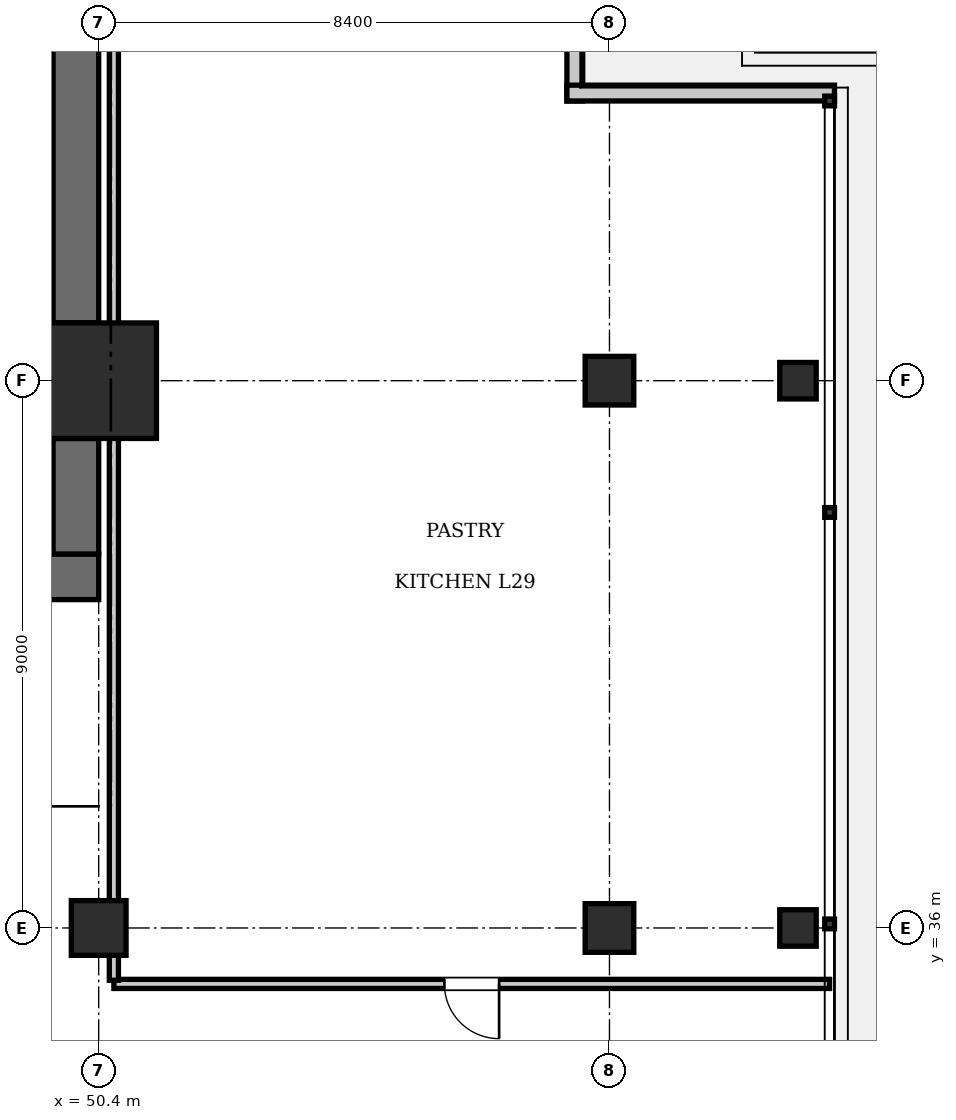
"""IFC4 building model, lengths in metres.
Left out: names, types, materials, properties, quantities, classifications, styles, units other than length and angle.
Written with IfcOpenShell. Run it as: python <this file> out.ifc"""

import sys

from ifc_helpers import new_model, si_unit, direction, frame, frame_2d, origin, origin_2d, place, context, subcontext, project, spatial, rectangle, i_section, extrude, element, fill, save


model = new_model("IFC4")
c1 = context("Model", 3, precision=1e-05, world=origin(), true_north=direction((0.0, 1.0)))
c2 = subcontext(c1, "Body", "Model", "MODEL_VIEW")
j1 = project(units=[si_unit("LENGTHUNIT", "METRE"), si_unit("PLANEANGLEUNIT", "RADIAN")], contexts=[c1])
p1 = place(None, origin())
s1 = spatial("IfcSite", under=j1, at=p1, CompositionType="ELEMENT")
p2 = place(p1, origin())
s2 = spatial("IfcBuilding", under=s1, at=p2, CompositionType="ELEMENT")
p3 = place(p2, frame((0.0, 0.0, 122.5)))
s3 = spatial("IfcBuildingStorey", under=s2, at=p3, CompositionType="ELEMENT", Elevation=122.5)
p4 = place(p3, frame((50.4, 45.0, 0.0), z_axis=(0.0, 0.0, 1.0), x_axis=(1.0, 0.0, 0.0)))
e1 = element("IfcColumn", 1, at=p4, inside=s3, PredefinedType="COLUMN", context=c2, shape_type="SweptSolid", body=[
    extrude(rectangle(XDim=1.9, YDim=1.9, at=origin_2d()), origin(), (0.0, 0.0, 1.0), 4.9),
])
p5 = place(p3, frame((43.6, 41.775, 0.0), z_axis=(0.0, 0.0, 1.0), x_axis=(1.0, 0.0, 0.0)))
e2 = element("IfcWall", 2, at=p5, inside=s3, PredefinedType="SHEAR", context=c2, shape_type="SweptSolid", body=[
    extrude(rectangle(XDim=6.8, YDim=0.75, at=frame_2d((3.4, 0.0))), origin(), (0.0, 0.0, 1.0), 4.9),
])
p6 = place(p5, frame((3.9, 0.0, 0.0)))
e3 = element("IfcOpeningElement", 3, at=p6, cuts=e2, PredefinedType="OPENING", context=c2, shape_type="SweptSolid", body=[
    extrude(rectangle(XDim=1.15, YDim=2.15, at=frame_2d((0.575, 1.075))), frame((0.0, 0.385, 0.0), z_axis=(0.0, -1.0, 0.0), x_axis=(1.0, 0.0, 0.0)), (0.0, 0.0, 1.0), 0.77),
])
p7 = place(p5, frame((0.55, 0.0, 0.0)))
e4 = element("IfcOpeningElement", 4, at=p7, cuts=e2, PredefinedType="OPENING", context=c2, shape_type="SweptSolid", body=[
    extrude(rectangle(XDim=1.1, YDim=2.2, at=frame_2d((0.55, 1.1))), frame((0.0, 0.385, 0.0), z_axis=(0.0, -1.0, 0.0), x_axis=(1.0, 0.0, 0.0)), (0.0, 0.0, 1.0), 0.77),
])
p8 = place(p3, frame((50.025, 42.15, 0.0), z_axis=(0.0, 0.0, 1.0), x_axis=(0.0, 1.0, 0.0)))
e5 = element("IfcWall", 5, at=p8, inside=s3, PredefinedType="SHEAR", context=c2, shape_type="SweptSolid", body=[
    extrude(rectangle(XDim=1.9, YDim=0.75, at=frame_2d((0.95, 0.0))), origin(), (0.0, 0.0, 1.0), 4.9),
])
p9 = place(p3, frame((50.025, 45.95, 0.0), z_axis=(0.0, 0.0, 1.0), x_axis=(0.0, 1.0, 0.0)))
e6 = element("IfcWall", 6, at=p9, inside=s3, PredefinedType="SHEAR", context=c2, shape_type="SweptSolid", body=[
    extrude(rectangle(XDim=7.3, YDim=0.75, at=frame_2d((3.65, 0.0))), origin(), (0.0, 0.0, 1.0), 4.9),
])
p10 = place(p3, frame((50.4, 36.0, 0.0), z_axis=(0.0, 0.0, 1.0), x_axis=(1.0, 0.0, 0.0)))
e7 = element("IfcColumn", 7, at=p10, inside=s3, PredefinedType="COLUMN", context=c2, shape_type="SweptSolid", body=[
    extrude(rectangle(XDim=0.9, YDim=0.9, at=origin_2d()), origin(), (0.0, 0.0, 1.0), 4.9),
])
for number, where, z_axis, x_axis in (
    (8, (58.8, 36.0, 0.0), (0.0, 0.0, 1.0), (1.0, 0.0, 0.0)),
    (9, (58.8, 45.0, 0.0), (0.0, 0.0, 1.0), (1.0, 0.0, 0.0)),
):
    element("IfcColumn", number, at=place(p3, frame(where, z_axis=z_axis, x_axis=x_axis)), inside=s3, PredefinedType="COLUMN", context=c2, shape_type="SweptSolid", body=[
        extrude(rectangle(XDim=0.8, YDim=0.8, at=origin_2d()), origin(), (0.0, 0.0, 1.0), 4.9),
    ])
for number, where, z_axis, x_axis in (
    (10, (61.9, 36.0, -0.24), (0.0, 0.0, 1.0), (1.0, 0.0, 0.0)),
    (11, (61.9, 45.0, -0.24), (0.0, 0.0, 1.0), (1.0, 0.0, 0.0)),
):
    element("IfcColumn", number, at=place(p3, frame(where, z_axis=z_axis, x_axis=x_axis)), inside=s3, PredefinedType="COLUMN", context=c2, shape_type="SweptSolid", body=[
        extrude(i_section(OverallWidth=0.6, OverallDepth=0.6, WebThickness=0.025, FlangeThickness=0.038, at=origin_2d()), origin(), (0.0, 0.0, 1.0), 5.14),
    ])
for number, where, z_axis, x_axis in (
    (12, (58.23, 54.0, 0.0), (0.0, 0.0, 1.0), (0.0, -1.0, 0.0)),
    (13, (58.1, 49.73, 0.0), (0.0, 0.0, 1.0), (1.0, 0.0, 0.0)),
):
    element("IfcWall", number, at=place(p3, frame(where, z_axis=z_axis, x_axis=x_axis)), inside=s3, PredefinedType="SOLIDWALL", context=c2, shape_type="SweptSolid", body=[
        extrude(rectangle(XDim=4.4, YDim=0.26, at=frame_2d((2.2, 0.0))), origin(), (0.0, 0.0, 1.0), 4.66),
    ])
p11 = place(p3, frame((50.65, 35.08, 0.0), z_axis=(0.0, 0.0, 1.0), x_axis=(1.0, 0.0, 0.0)))
e14 = element("IfcWall", 14, at=p11, inside=s3, PredefinedType="PARTITIONING", context=c2, shape_type="SweptSolid", body=[
    extrude(rectangle(XDim=11.77, YDim=0.15, at=frame_2d((5.885, 0.0))), origin(), (0.0, 0.0, 1.0), 4.66),
])
p12 = place(p11, frame((5.435, 0.0, 0.0)))
e15 = element("IfcOpeningElement", 15, at=p12, cuts=e14, PredefinedType="OPENING", context=c2, shape_type="SweptSolid", body=[
    extrude(rectangle(XDim=0.9, YDim=2.1, at=frame_2d((0.45, 1.05))), frame((0.0, 0.085, 0.0), z_axis=(0.0, -1.0, 0.0), x_axis=(1.0, 0.0, 0.0)), (0.0, 0.0, 1.0), 0.17),
])
p13 = place(p3, frame((50.65, 35.14, 0.0), z_axis=(0.0, 0.0, 1.0), x_axis=(0.0, 1.0, 0.0)))
e16 = element("IfcWall", 16, at=p13, inside=s3, PredefinedType="PARTITIONING", context=c2, shape_type="SweptSolid", body=[
    extrude(rectangle(XDim=18.78, YDim=0.15, at=frame_2d((9.39, 0.0))), origin(), (0.0, 0.0, 1.0), 4.66),
])
p14 = place(p12, frame((0.9, 0.0, 0.0), z_axis=(0.0, 0.0, 1.0), x_axis=(-1.0, 0.0, 0.0)))
e17 = element("IfcDoor", 17, at=p14, inside=s3, OperationType="SINGLE_SWING_LEFT", PredefinedType="DOOR", context=c2, shape_type="SweptSolid", body=[
    extrude(rectangle(XDim=0.9, YDim=2.1, at=frame_2d((0.45, 1.05))), frame((0.0, 0.025, 0.0), z_axis=(0.0, -1.0, 0.0), x_axis=(1.0, 0.0, 0.0)), (0.0, 0.0, 1.0), 0.05),
])
fill(e15, e17)
save(model, sys.argv[1])
